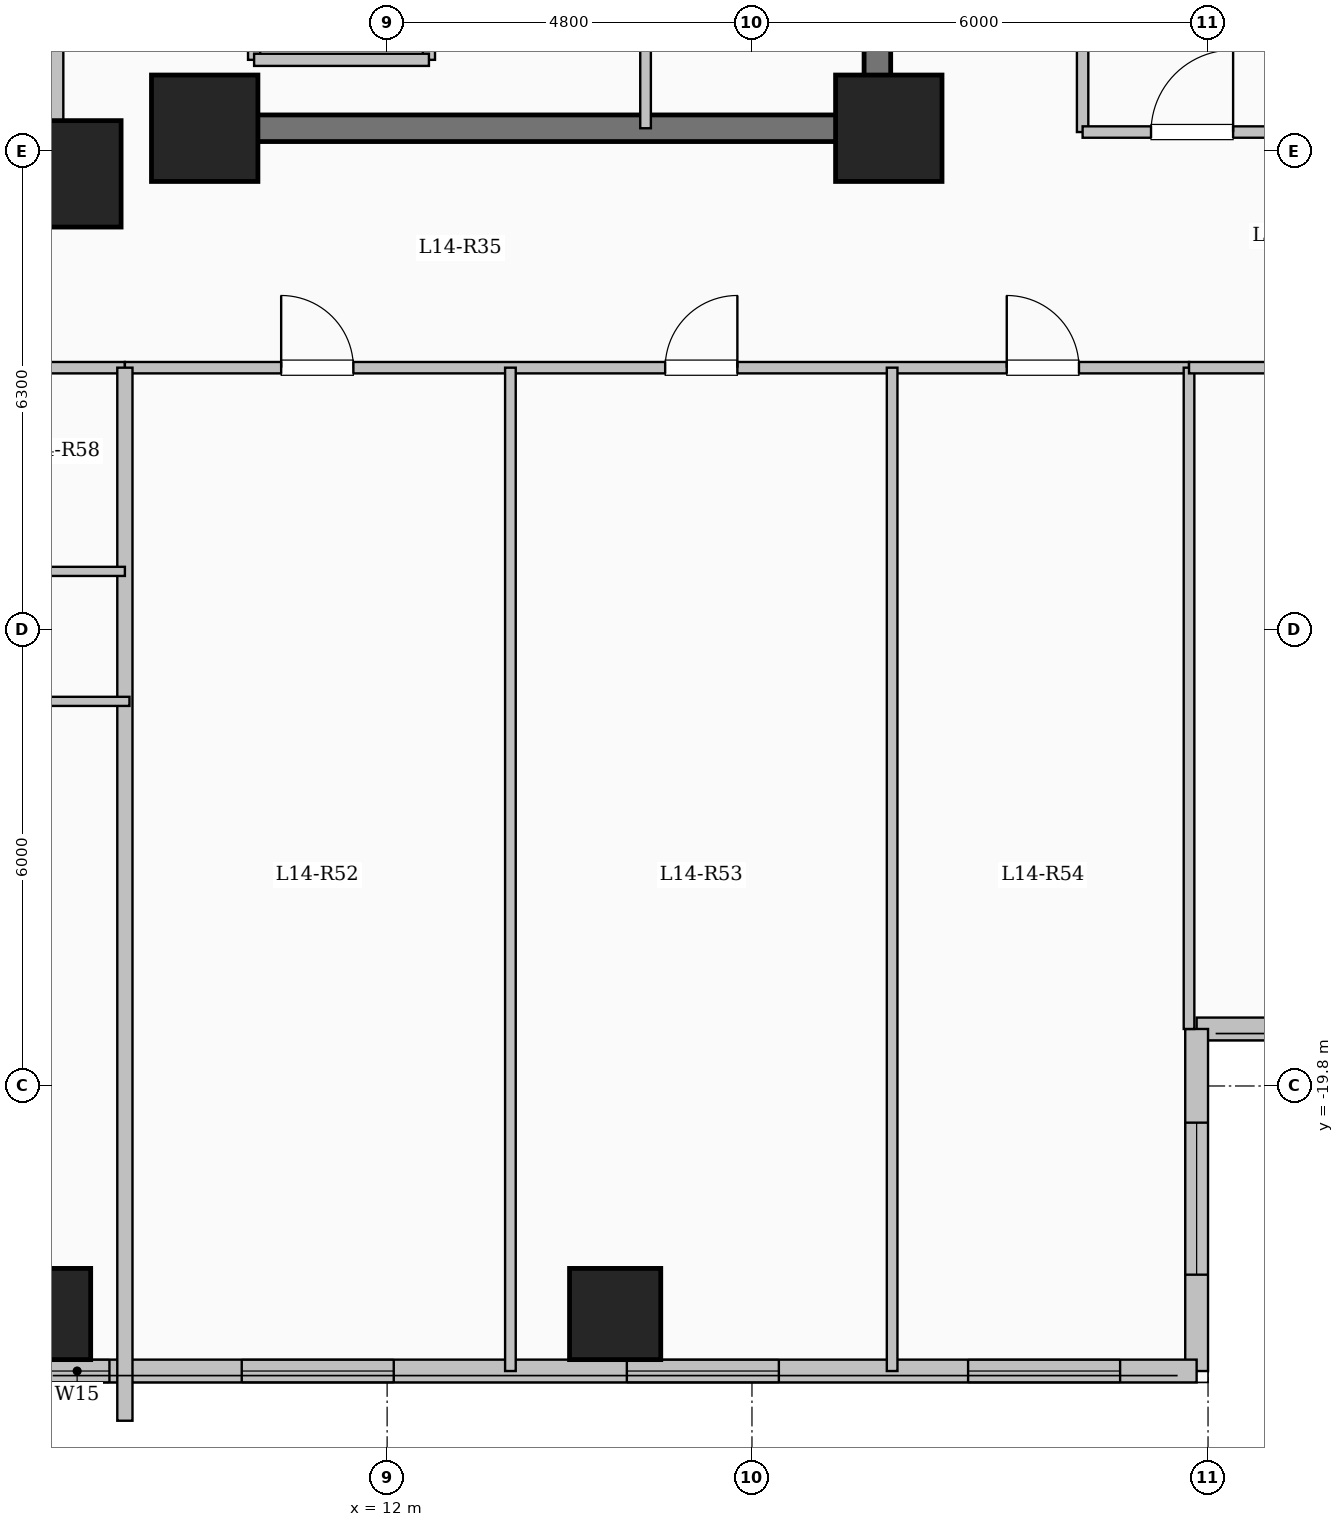
"""IFC4 building model, lengths in metres.
Left out: names, types, materials, properties, quantities, classifications, styles, units other than length and angle.
Written with IfcOpenShell. Run it as: python <this file> out.ifc"""

import sys

from ifc_helpers import new_model, si_unit, direction, frame, frame_2d, origin, origin_2d, place, context, subcontext, project, spatial, rectangle, extrude, element, fill, save


model = new_model("IFC4")
c1 = context("Model", 3, precision=1e-05, world=origin(), true_north=direction((0.0, 1.0)))
c2 = subcontext(c1, "Body", "Model", "MODEL_VIEW")
j1 = project(units=[si_unit("LENGTHUNIT", "METRE"), si_unit("PLANEANGLEUNIT", "RADIAN")], contexts=[c1])
p1 = place(None, origin())
s1 = spatial("IfcSite", under=j1, at=p1, CompositionType="ELEMENT")
p2 = place(p1, origin())
s2 = spatial("IfcBuilding", under=s1, at=p2, CompositionType="ELEMENT")
p3 = place(p2, frame((0.0, 0.0, 54.15)))
s3 = spatial("IfcBuildingStorey", under=s2, at=p3, CompositionType="ELEMENT", Elevation=54.15)
for number, where, z_axis, x_axis in (
    (1, (7.8, -7.8, 0.0), (0.0, 0.0, 1.0), (1.0, 0.0, 0.0)),
    (2, (9.6, -7.2, 0.0), (0.0, 0.0, 1.0), (1.0, 0.0, 0.0)),
    (3, (18.6, -7.2, 0.0), (0.0, 0.0, 1.0), (1.0, 0.0, 0.0)),
):
    element("IfcColumn", number, at=place(p3, frame(where, z_axis=z_axis, x_axis=x_axis)), inside=s3, PredefinedType="COLUMN", context=c2, shape_type="SweptSolid", body=[
        extrude(rectangle(XDim=1.4, YDim=1.4, at=origin_2d()), origin(), (0.0, 0.0, 1.0), 3.35),
    ])
for number, where, z_axis, x_axis in (
    (4, (7.5, -22.8, 0.0), (0.0, 0.0, 1.0), (1.0, 0.0, 0.0)),
    (5, (15.0, -22.8, 0.0), (0.0, 0.0, 1.0), (1.0, 0.0, 0.0)),
):
    element("IfcColumn", number, at=place(p3, frame(where, z_axis=z_axis, x_axis=x_axis)), inside=s3, PredefinedType="COLUMN", context=c2, shape_type="SweptSolid", body=[
        extrude(rectangle(XDim=1.2, YDim=1.2, at=origin_2d()), origin(), (0.0, 0.0, 1.0), 3.35),
    ])
p4 = place(p3, frame((-7.62, -7.62, 0.0), z_axis=(0.0, 0.0, 1.0), x_axis=(1.0, 0.0, 0.0)))
e6 = element("IfcWall", 6, at=p4, inside=s3, PredefinedType="SOLIDWALL", context=c2, shape_type="SweptSolid", body=[
    extrude(rectangle(XDim=15.24, YDim=0.24, at=frame_2d((7.62, 0.0))), origin(), (0.0, 0.0, 1.0), 3.1),
])
p5 = place(p4, frame((6.92, 0.0, 0.95)))
e7 = element("IfcOpeningElement", 7, at=p5, cuts=e6, PredefinedType="OPENING", context=c2, shape_type="SweptSolid", body=[
    extrude(rectangle(XDim=1.4, YDim=1.5, at=frame_2d((0.7, 0.75))), frame((0.0, 0.13, 0.0), z_axis=(0.0, -1.0, 0.0), x_axis=(1.0, 0.0, 0.0)), (0.0, 0.0, 1.0), 0.26),
])
p6 = place(p3, frame((7.62, -7.62, 0.0), z_axis=(0.0, 0.0, 1.0), x_axis=(0.0, 1.0, 0.0)))
e8 = element("IfcWall", 8, at=p6, inside=s3, PredefinedType="SOLIDWALL", context=c2, shape_type="SweptSolid", body=[
    extrude(rectangle(XDim=15.24, YDim=0.24, at=frame_2d((7.62, 0.0))), origin(), (0.0, 0.0, 1.0), 3.1),
])
p7 = place(p6, frame((6.92, 0.0, 0.95)))
e9 = element("IfcOpeningElement", 9, at=p7, cuts=e8, PredefinedType="OPENING", context=c2, shape_type="SweptSolid", body=[
    extrude(rectangle(XDim=1.4, YDim=1.5, at=frame_2d((0.7, 0.75))), frame((0.0, 0.13, 0.0), z_axis=(0.0, -1.0, 0.0), x_axis=(1.0, 0.0, 0.0)), (0.0, 0.0, 1.0), 0.26),
])
p8 = place(p3, frame((28.65, -19.05, 0.0), z_axis=(0.0, 0.0, 1.0), x_axis=(-1.0, 0.0, 0.0)))
e10 = element("IfcWall", 10, at=p8, inside=s3, PredefinedType="SOLIDWALL", context=c2, shape_type="SweptSolid", body=[
    extrude(rectangle(XDim=6.0, YDim=0.3, at=frame_2d((3.0, 0.0))), origin(), (0.0, 0.0, 1.0), 3.1),
])
p9 = place(p8, frame((1.825, 0.0, 0.9)))
e11 = element("IfcOpeningElement", 11, at=p9, cuts=e10, PredefinedType="OPENING", context=c2, shape_type="SweptSolid", body=[
    extrude(rectangle(XDim=2.4, YDim=1.8, at=frame_2d((1.2, 0.9))), frame((0.0, 0.16, 0.0), z_axis=(0.0, -1.0, 0.0), x_axis=(1.0, 0.0, 0.0)), (0.0, 0.0, 1.0), 0.32),
])
p10 = place(p3, frame((22.65, -19.05, 0.0), z_axis=(0.0, 0.0, 1.0), x_axis=(0.0, -1.0, 0.0)))
e12 = element("IfcWall", 12, at=p10, inside=s3, PredefinedType="SOLIDWALL", context=c2, shape_type="SweptSolid", body=[
    extrude(rectangle(XDim=4.5, YDim=0.3, at=frame_2d((2.25, 0.0))), origin(), (0.0, 0.0, 1.0), 3.1),
])
p11 = place(p10, frame((1.232, 0.0, 0.9)))
e13 = element("IfcOpeningElement", 13, at=p11, cuts=e12, PredefinedType="OPENING", context=c2, shape_type="SweptSolid", body=[
    extrude(rectangle(XDim=2.0, YDim=1.7, at=frame_2d((1.0, 0.85))), frame((0.0, 0.16, 0.0), z_axis=(0.0, -1.0, 0.0), x_axis=(1.0, 0.0, 0.0)), (0.0, 0.0, 1.0), 0.32),
])
p12 = place(p3, frame((22.65, -23.55, 0.0), z_axis=(0.0, 0.0, 1.0), x_axis=(-1.0, 0.0, 0.0)))
e14 = element("IfcWall", 14, at=p12, inside=s3, PredefinedType="SOLIDWALL", context=c2, shape_type="SweptSolid", body=[
    extrude(rectangle(XDim=15.3, YDim=0.3, at=frame_2d((7.65, 0.0))), origin(), (0.0, 0.0, 1.0), 3.1),
])
p13 = place(p12, frame((1.007, 0.0, 0.9)))
e15 = element("IfcOpeningElement", 15, at=p13, cuts=e14, PredefinedType="OPENING", context=c2, shape_type="SweptSolid", body=[
    extrude(rectangle(XDim=2.0, YDim=1.7, at=frame_2d((1.0, 0.85))), frame((0.0, 0.16, 0.0), z_axis=(0.0, -1.0, 0.0), x_axis=(1.0, 0.0, 0.0)), (0.0, 0.0, 1.0), 0.32),
])
p14 = place(p12, frame((5.496, 0.0, 0.9)))
e16 = element("IfcOpeningElement", 16, at=p14, cuts=e14, PredefinedType="OPENING", context=c2, shape_type="SweptSolid", body=[
    extrude(rectangle(XDim=2.0, YDim=1.7, at=frame_2d((1.0, 0.85))), frame((0.0, 0.16, 0.0), z_axis=(0.0, -1.0, 0.0), x_axis=(1.0, 0.0, 0.0)), (0.0, 0.0, 1.0), 0.32),
])
p15 = place(p12, frame((10.563, 0.0, 0.9)))
e17 = element("IfcOpeningElement", 17, at=p15, cuts=e14, PredefinedType="OPENING", context=c2, shape_type="SweptSolid", body=[
    extrude(rectangle(XDim=2.0, YDim=1.7, at=frame_2d((1.0, 0.85))), frame((0.0, 0.16, 0.0), z_axis=(0.0, -1.0, 0.0), x_axis=(1.0, 0.0, 0.0)), (0.0, 0.0, 1.0), 0.32),
])
p16 = place(p12, frame((14.303, 0.0, 0.95)))
e18 = element("IfcOpeningElement", 18, at=p16, cuts=e14, PredefinedType="OPENING", context=c2, shape_type="SweptSolid", body=[
    extrude(rectangle(XDim=0.85, YDim=1.5, at=frame_2d((0.425, 0.75))), frame((0.0, 0.16, 0.0), z_axis=(0.0, -1.0, 0.0), x_axis=(1.0, 0.0, 0.0)), (0.0, 0.0, 1.0), 0.32),
])
for number, where, z_axis, x_axis in (
    (19, (10.25, -6.3, 0.0), (0.0, 0.0, 1.0), (0.0, 1.0, 0.0)),
    (20, (12.55, -6.3, 0.0), (0.0, 0.0, 1.0), (0.0, 1.0, 0.0)),
):
    element("IfcWall", number, at=place(p3, frame(where, z_axis=z_axis, x_axis=x_axis)), inside=s3, PredefinedType="SOLIDWALL", context=c2, shape_type="SweptSolid", body=[
        extrude(rectangle(XDim=2.6, YDim=0.16, at=frame_2d((1.3, 0.0))), origin(), (0.0, 0.0, 1.0), 3.1),
    ])
p17 = place(p3, frame((10.25, -6.3, 0.0), z_axis=(0.0, 0.0, 1.0), x_axis=(1.0, 0.0, 0.0)))
e21 = element("IfcWall", 21, at=p17, inside=s3, PredefinedType="SOLIDWALL", context=c2, shape_type="SweptSolid", body=[
    extrude(rectangle(XDim=2.3, YDim=0.16, at=frame_2d((1.15, 0.0))), origin(), (0.0, 0.0, 1.0), 3.1),
])
p18 = place(p3, frame((18.45, -7.375, 0.0), z_axis=(0.0, 0.0, 1.0), x_axis=(0.0, 1.0, 0.0)))
e22 = element("IfcWall", 22, at=p18, inside=s3, PredefinedType="SHEAR", context=c2, shape_type="SweptSolid", body=[
    extrude(rectangle(XDim=14.05, YDim=0.35, at=frame_2d((7.025, 0.0))), origin(), (0.0, 0.0, 1.0), 3.35),
])
p19 = place(p3, frame((10.075, -7.2, 0.0), z_axis=(0.0, 0.0, 1.0), x_axis=(1.0, 0.0, 0.0)))
e23 = element("IfcWall", 23, at=p19, inside=s3, PredefinedType="SHEAR", context=c2, shape_type="SweptSolid", body=[
    extrude(rectangle(XDim=8.55, YDim=0.35, at=frame_2d((4.275, 0.0))), origin(), (0.0, 0.0, 1.0), 3.35),
])
p20 = place(p3, frame((15.4, -7.2, 0.0), z_axis=(0.0, 0.0, 1.0), x_axis=(0.0, 1.0, 0.0)))
e24 = element("IfcWall", 24, at=p20, inside=s3, PredefinedType="PARTITIONING", context=c2, shape_type="SweptSolid", body=[
    extrude(rectangle(XDim=10.45, YDim=0.14, at=frame_2d((5.225, 0.0))), origin(), (0.0, 0.0, 1.0), 3.1),
])
p21 = place(p20, frame((9.25, 0.0, 0.0)))
e25 = element("IfcOpeningElement", 25, at=p21, cuts=e24, PredefinedType="OPENING", context=c2, shape_type="SweptSolid", body=[
    extrude(rectangle(XDim=0.9, YDim=2.08, at=frame_2d((0.45, 1.04))), frame((0.0, 0.08, 0.0), z_axis=(0.0, -1.0, 0.0), x_axis=(1.0, 0.0, 0.0)), (0.0, 0.0, 1.0), 0.16),
])
p22 = place(p3, frame((21.15, -7.25, 0.0), z_axis=(0.0, 0.0, 1.0), x_axis=(0.0, 1.0, 0.0)))
e26 = element("IfcWall", 26, at=p22, inside=s3, PredefinedType="PARTITIONING", context=c2, shape_type="SweptSolid", body=[
    extrude(rectangle(XDim=18.0, YDim=0.15, at=frame_2d((9.0, 0.0))), origin(), (0.0, 0.0, 1.0), 2.585),
])
p23 = place(p3, frame((-8.55, -10.35, 0.0), z_axis=(0.0, 0.0, 1.0), x_axis=(1.0, 0.0, 0.0)))
e27 = element("IfcWall", 27, at=p23, inside=s3, PredefinedType="PARTITIONING", context=c2, shape_type="SweptSolid", body=[
    extrude(rectangle(XDim=17.1, YDim=0.15, at=frame_2d((8.55, 0.0))), origin(), (0.0, 0.0, 1.0), 3.1),
])
p24 = place(p23, frame((0.8, 0.0, 0.0)))
e28 = element("IfcOpeningElement", 28, at=p24, cuts=e27, PredefinedType="OPENING", context=c2, shape_type="SweptSolid", body=[
    extrude(rectangle(XDim=0.96, YDim=2.15, at=frame_2d((0.48, 1.075))), frame((0.0, 0.085, 0.0), z_axis=(0.0, -1.0, 0.0), x_axis=(1.0, 0.0, 0.0)), (0.0, 0.0, 1.0), 0.17),
])
p25 = place(p3, frame((8.55, -10.35, 0.0), z_axis=(0.0, 0.0, 1.0), x_axis=(1.0, 0.0, 0.0)))
e29 = element("IfcWall", 29, at=p25, inside=s3, PredefinedType="PARTITIONING", context=c2, shape_type="SweptSolid", body=[
    extrude(rectangle(XDim=14.0, YDim=0.15, at=frame_2d((7.0, 0.0))), origin(), (0.0, 0.0, 1.0), 3.1),
])
p26 = place(p25, frame((2.056, 0.0, 0.0)))
e30 = element("IfcOpeningElement", 30, at=p26, cuts=e29, PredefinedType="OPENING", context=c2, shape_type="SweptSolid", body=[
    extrude(rectangle(XDim=0.95, YDim=2.15, at=frame_2d((0.475, 1.075))), frame((0.0, 0.085, 0.0), z_axis=(0.0, -1.0, 0.0), x_axis=(1.0, 0.0, 0.0)), (0.0, 0.0, 1.0), 0.17),
])
p27 = place(p25, frame((7.108, 0.0, 0.0)))
e31 = element("IfcOpeningElement", 31, at=p27, cuts=e29, PredefinedType="OPENING", context=c2, shape_type="SweptSolid", body=[
    extrude(rectangle(XDim=0.95, YDim=2.15, at=frame_2d((0.475, 1.075))), frame((0.0, 0.085, 0.0), z_axis=(0.0, -1.0, 0.0), x_axis=(1.0, 0.0, 0.0)), (0.0, 0.0, 1.0), 0.17),
])
p28 = place(p25, frame((11.602, 0.0, 0.0)))
e32 = element("IfcOpeningElement", 32, at=p28, cuts=e29, PredefinedType="OPENING", context=c2, shape_type="SweptSolid", body=[
    extrude(rectangle(XDim=0.95, YDim=2.15, at=frame_2d((0.475, 1.075))), frame((0.0, 0.085, 0.0), z_axis=(0.0, -1.0, 0.0), x_axis=(1.0, 0.0, 0.0)), (0.0, 0.0, 1.0), 0.17),
])
for number, where, z_axis, x_axis in (
    (33, (13.622, -23.55, 0.0), (0.0, 0.0, 1.0), (0.0, 1.0, 0.0)),
    (34, (18.644, -23.55, 0.0), (0.0, 0.0, 1.0), (0.0, 1.0, 0.0)),
):
    element("IfcWall", number, at=place(p3, frame(where, z_axis=z_axis, x_axis=x_axis)), inside=s3, PredefinedType="PARTITIONING", context=c2, shape_type="SweptSolid", body=[
        extrude(rectangle(XDim=13.2, YDim=0.14, at=frame_2d((6.6, 0.0))), origin(), (0.0, 0.0, 1.0), 3.1),
    ])
p29 = place(p3, frame((8.55, -24.204, 0.0), z_axis=(0.0, 0.0, 1.0), x_axis=(0.0, 1.0, 0.0)))
e35 = element("IfcWall", 35, at=p29, inside=s3, PredefinedType="SOLIDWALL", context=c2, shape_type="SweptSolid", body=[
    extrude(rectangle(XDim=13.854, YDim=0.2, at=frame_2d((6.927, 0.0))), origin(), (0.0, 0.0, 1.0), 3.1),
])
p30 = place(p3, frame((3.872, -13.03, 0.0), z_axis=(0.0, 0.0, 1.0), x_axis=(1.0, 0.0, 0.0)))
e36 = element("IfcWall", 36, at=p30, inside=s3, PredefinedType="PARTITIONING", context=c2, shape_type="SweptSolid", body=[
    extrude(rectangle(XDim=4.678, YDim=0.12, at=frame_2d((2.339, 0.0))), origin(), (0.0, 0.0, 1.0), 2.585),
])
p31 = place(p30, frame((1.899, 0.0, 0.0)))
e37 = element("IfcOpeningElement", 37, at=p31, cuts=e36, PredefinedType="OPENING", context=c2, shape_type="SweptSolid", body=[
    extrude(rectangle(XDim=0.88, YDim=2.1, at=frame_2d((0.44, 1.05))), frame((0.0, 0.07, 0.0), z_axis=(0.0, -1.0, 0.0), x_axis=(1.0, 0.0, 0.0)), (0.0, 0.0, 1.0), 0.14),
])
p32 = place(p3, frame((-2.31, -14.74, 0.0), z_axis=(0.0, 0.0, 1.0), x_axis=(1.0, 0.0, 0.0)))
e38 = element("IfcWall", 38, at=p32, inside=s3, PredefinedType="PARTITIONING", context=c2, shape_type="SweptSolid", body=[
    extrude(rectangle(XDim=10.92, YDim=0.12, at=frame_2d((5.46, 0.0))), origin(), (0.0, 0.0, 1.0), 2.585),
])
p33 = place(p32, frame((1.35, 0.0, 0.0)))
e39 = element("IfcOpeningElement", 39, at=p33, cuts=e38, PredefinedType="OPENING", context=c2, shape_type="SweptSolid", body=[
    extrude(rectangle(XDim=0.88, YDim=2.1, at=frame_2d((0.44, 1.05))), frame((0.0, 0.07, 0.0), z_axis=(0.0, -1.0, 0.0), x_axis=(1.0, 0.0, 0.0)), (0.0, 0.0, 1.0), 0.14),
])
p34 = place(p32, frame((4.93, 0.0, 0.0)))
e40 = element("IfcOpeningElement", 40, at=p34, cuts=e38, PredefinedType="OPENING", context=c2, shape_type="SweptSolid", body=[
    extrude(rectangle(XDim=0.88, YDim=2.1, at=frame_2d((0.44, 1.05))), frame((0.0, 0.07, 0.0), z_axis=(0.0, -1.0, 0.0), x_axis=(1.0, 0.0, 0.0)), (0.0, 0.0, 1.0), 0.14),
])
p35 = place(p32, frame((8.51, 0.0, 0.0)))
e41 = element("IfcOpeningElement", 41, at=p35, cuts=e38, PredefinedType="OPENING", context=c2, shape_type="SweptSolid", body=[
    extrude(rectangle(XDim=0.88, YDim=2.1, at=frame_2d((0.44, 1.05))), frame((0.0, 0.07, 0.0), z_axis=(0.0, -1.0, 0.0), x_axis=(1.0, 0.0, 0.0)), (0.0, 0.0, 1.0), 0.14),
])
p36 = place(p3, frame((21.15, -7.25, 0.0), z_axis=(0.0, 0.0, 1.0), x_axis=(1.0, 0.0, 0.0)))
e42 = element("IfcWall", 42, at=p36, inside=s3, PredefinedType="PARTITIONING", context=c2, shape_type="SweptSolid", body=[
    extrude(rectangle(XDim=7.53, YDim=0.15, at=frame_2d((3.765, 0.0))), origin(), (0.0, 0.0, 1.0), 3.1),
])
p37 = place(p36, frame((0.9, 0.0, 0.0)))
e43 = element("IfcOpeningElement", 43, at=p37, cuts=e42, PredefinedType="OPENING", context=c2, shape_type="SweptSolid", body=[
    extrude(rectangle(XDim=1.08, YDim=2.15, at=frame_2d((0.54, 1.075))), frame((0.0, 0.085, 0.0), z_axis=(0.0, -1.0, 0.0), x_axis=(1.0, 0.0, 0.0)), (0.0, 0.0, 1.0), 0.17),
])
p38 = place(p3, frame((22.55, -19.05, 0.0), z_axis=(0.0, 0.0, 1.0), x_axis=(0.0, 1.0, 0.0)))
e44 = element("IfcWall", 44, at=p38, inside=s3, PredefinedType="PARTITIONING", context=c2, shape_type="SweptSolid", body=[
    extrude(rectangle(XDim=8.7, YDim=0.14, at=frame_2d((4.35, 0.0))), origin(), (0.0, 0.0, 1.0), 3.1),
])
p39 = place(p3, frame((22.55, -10.35, 0.0), z_axis=(0.0, 0.0, 1.0), x_axis=(1.0, 0.0, 0.0)))
e45 = element("IfcWall", 45, at=p39, inside=s3, PredefinedType="PARTITIONING", context=c2, shape_type="SweptSolid", body=[
    extrude(rectangle(XDim=6.13, YDim=0.15, at=frame_2d((3.065, 0.0))), origin(), (0.0, 0.0, 1.0), 3.1),
])
p40 = place(p39, frame((2.59, 0.0, 0.0)))
e46 = element("IfcOpeningElement", 46, at=p40, cuts=e45, PredefinedType="OPENING", context=c2, shape_type="SweptSolid", body=[
    extrude(rectangle(XDim=0.95, YDim=2.15, at=frame_2d((0.475, 1.075))), frame((0.0, 0.085, 0.0), z_axis=(0.0, -1.0, 0.0), x_axis=(1.0, 0.0, 0.0)), (0.0, 0.0, 1.0), 0.17),
])
p41 = place(p11, origin())
e47 = element("IfcWindow", 47, at=p41, inside=s3, PartitioningType="SINGLE_PANEL", PredefinedType="WINDOW", context=c2, shape_type="SweptSolid", body=[
    extrude(rectangle(XDim=2.0, YDim=1.7, at=frame_2d((1.0, 0.85))), frame((0.0, 0.03, 0.0), z_axis=(0.0, -1.0, 0.0), x_axis=(1.0, 0.0, 0.0)), (0.0, 0.0, 1.0), 0.06),
])
fill(e13, e47)
p42 = place(p13, origin())
e48 = element("IfcWindow", 48, at=p42, inside=s3, PartitioningType="SINGLE_PANEL", PredefinedType="WINDOW", context=c2, shape_type="SweptSolid", body=[
    extrude(rectangle(XDim=2.0, YDim=1.7, at=frame_2d((1.0, 0.85))), frame((0.0, 0.03, 0.0), z_axis=(0.0, -1.0, 0.0), x_axis=(1.0, 0.0, 0.0)), (0.0, 0.0, 1.0), 0.06),
])
fill(e15, e48)
p43 = place(p14, origin())
e49 = element("IfcWindow", 49, at=p43, inside=s3, PartitioningType="SINGLE_PANEL", PredefinedType="WINDOW", context=c2, shape_type="SweptSolid", body=[
    extrude(rectangle(XDim=2.0, YDim=1.7, at=frame_2d((1.0, 0.85))), frame((0.0, 0.03, 0.0), z_axis=(0.0, -1.0, 0.0), x_axis=(1.0, 0.0, 0.0)), (0.0, 0.0, 1.0), 0.06),
])
fill(e16, e49)
p44 = place(p15, origin())
e50 = element("IfcWindow", 50, at=p44, inside=s3, PartitioningType="SINGLE_PANEL", PredefinedType="WINDOW", context=c2, shape_type="SweptSolid", body=[
    extrude(rectangle(XDim=2.0, YDim=1.7, at=frame_2d((1.0, 0.85))), frame((0.0, 0.03, 0.0), z_axis=(0.0, -1.0, 0.0), x_axis=(1.0, 0.0, 0.0)), (0.0, 0.0, 1.0), 0.06),
])
fill(e17, e50)
p45 = place(p16, origin())
e51 = element("IfcWindow", 51, at=p45, inside=s3, PartitioningType="SINGLE_PANEL", PredefinedType="WINDOW", context=c2, shape_type="SweptSolid", body=[
    extrude(rectangle(XDim=0.85, YDim=1.5, at=frame_2d((0.425, 0.75))), frame((0.0, 0.03, 0.0), z_axis=(0.0, -1.0, 0.0), x_axis=(1.0, 0.0, 0.0)), (0.0, 0.0, 1.0), 0.06),
])
fill(e18, e51)
p46 = place(p26, origin())
e52 = element("IfcDoor", 52, at=p46, inside=s3, OperationType="SINGLE_SWING_LEFT", PredefinedType="DOOR", context=c2, shape_type="SweptSolid", body=[
    extrude(rectangle(XDim=0.95, YDim=2.15, at=frame_2d((0.475, 1.075))), frame((0.0, 0.025, 0.0), z_axis=(0.0, -1.0, 0.0), x_axis=(1.0, 0.0, 0.0)), (0.0, 0.0, 1.0), 0.05),
])
fill(e30, e52)
p47 = place(p27, origin())
e53 = element("IfcDoor", 53, at=p47, inside=s3, OperationType="SINGLE_SWING_RIGHT", PredefinedType="DOOR", context=c2, shape_type="SweptSolid", body=[
    extrude(rectangle(XDim=0.95, YDim=2.15, at=frame_2d((0.475, 1.075))), frame((0.0, 0.025, 0.0), z_axis=(0.0, -1.0, 0.0), x_axis=(1.0, 0.0, 0.0)), (0.0, 0.0, 1.0), 0.05),
])
fill(e31, e53)
p48 = place(p28, origin())
e54 = element("IfcDoor", 54, at=p48, inside=s3, OperationType="SINGLE_SWING_LEFT", PredefinedType="DOOR", context=c2, shape_type="SweptSolid", body=[
    extrude(rectangle(XDim=0.95, YDim=2.15, at=frame_2d((0.475, 1.075))), frame((0.0, 0.025, 0.0), z_axis=(0.0, -1.0, 0.0), x_axis=(1.0, 0.0, 0.0)), (0.0, 0.0, 1.0), 0.05),
])
fill(e32, e54)
p49 = place(p37, origin())
e55 = element("IfcDoor", 55, at=p49, inside=s3, OperationType="SINGLE_SWING_RIGHT", PredefinedType="DOOR", context=c2, shape_type="SweptSolid", body=[
    extrude(rectangle(XDim=1.08, YDim=2.15, at=frame_2d((0.54, 1.075))), frame((0.0, 0.025, 0.0), z_axis=(0.0, -1.0, 0.0), x_axis=(1.0, 0.0, 0.0)), (0.0, 0.0, 1.0), 0.05),
])
fill(e43, e55)
save(model, sys.argv[1])
